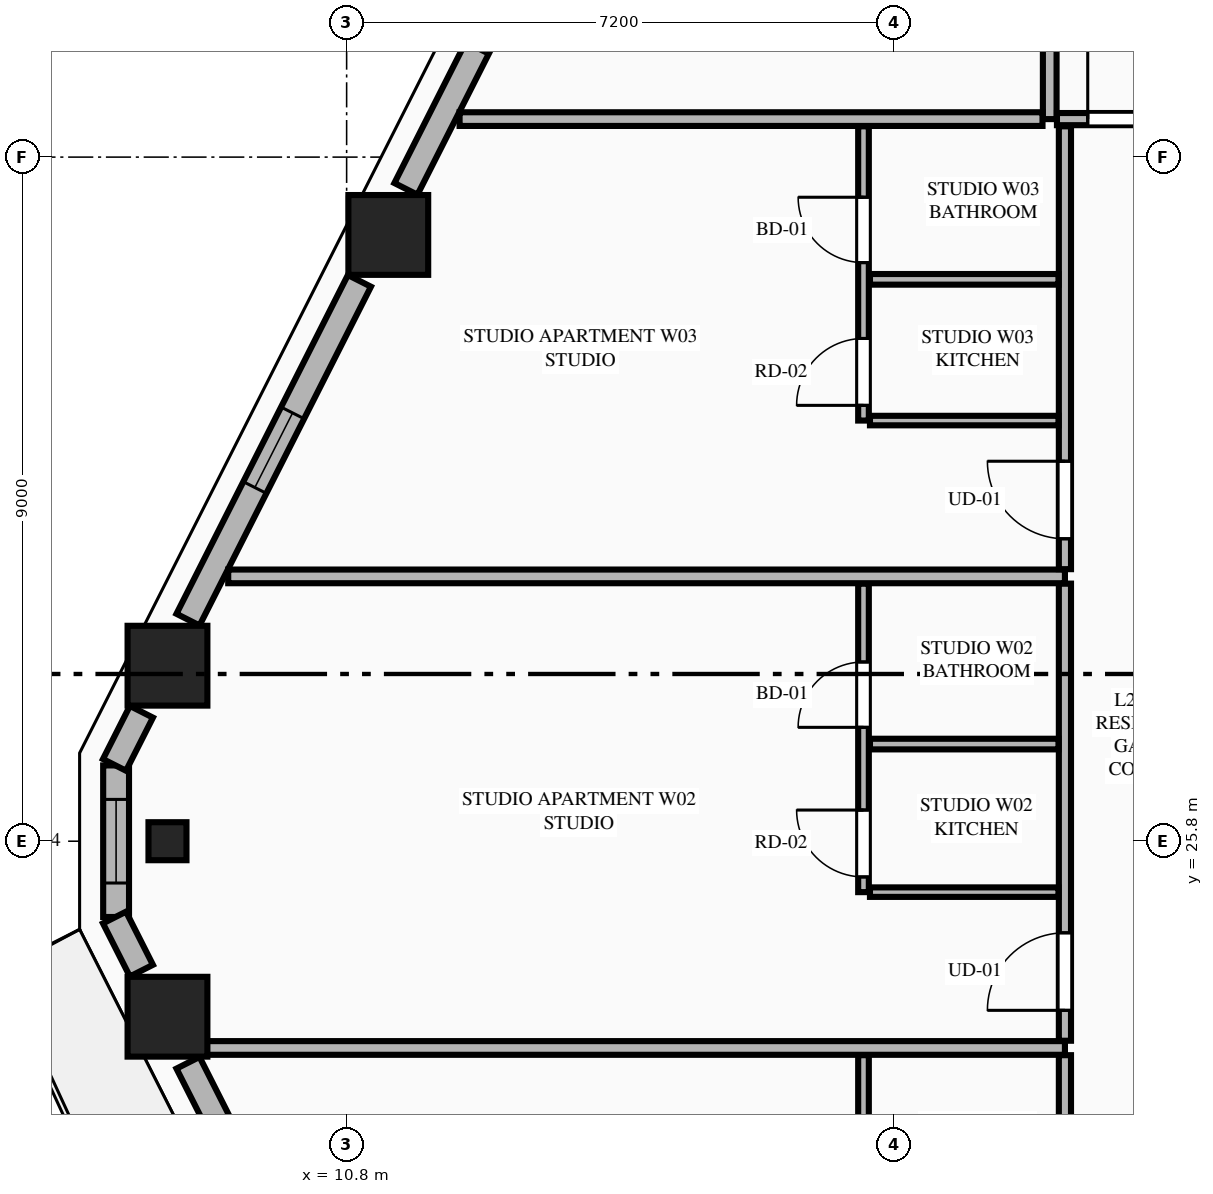
"""IFC4 building model, lengths in metres.
Left out: names, types, materials, properties, quantities, classifications, styles, units other than length and angle.
Written with IfcOpenShell. Run it as: python <this file> out.ifc"""

import sys

from ifc_helpers import new_model, si_unit, direction, frame, frame_2d, origin, origin_2d, place, context, subcontext, project, spatial, rectangle, extrude, element, fill, save


model = new_model("IFC4")
c1 = context("Model", 3, precision=1e-05, world=origin(), true_north=direction((0.0, 1.0)))
c2 = subcontext(c1, "Body", "Model", "MODEL_VIEW")
j1 = project(units=[si_unit("LENGTHUNIT", "METRE"), si_unit("PLANEANGLEUNIT", "RADIAN")], contexts=[c1])
p1 = place(None, origin())
s1 = spatial("IfcSite", under=j1, at=p1, CompositionType="ELEMENT")
p2 = place(p1, origin())
s2 = spatial("IfcBuilding", under=s1, at=p2, CompositionType="ELEMENT")
p3 = place(p2, frame((0.0, 0.0, 112.6)))
s3 = spatial("IfcBuildingStorey", under=s2, at=p3, CompositionType="ELEMENT", Elevation=112.6)
for number, where, z_axis, x_axis in (
    (1, (11.348, 33.776, 0.0), (0.0, 0.0, 1.0), (1.0, 0.0, 0.0)),
    (2, (8.443, 28.109, 0.0), (0.0, 0.0, 1.0), (1.0, 0.0, 0.0)),
    (3, (8.443, 23.491, 0.0), (0.0, 0.0, 1.0), (1.0, 0.0, 0.0)),
):
    element("IfcColumn", number, at=place(p3, frame(where, z_axis=z_axis, x_axis=x_axis)), inside=s3, PredefinedType="COLUMN", context=c2, shape_type="SweptSolid", body=[
        extrude(rectangle(XDim=1.05, YDim=1.05, at=origin_2d()), origin(), (0.0, 0.0, 1.0), 3.55),
    ])
p4 = place(p3, frame((8.443, 25.8, 0.0), z_axis=(0.0, 0.0, 1.0), x_axis=(0.0, -1.0, 0.0)))
e4 = element("IfcColumn", 4, at=p4, inside=s3, PredefinedType="PILASTER", context=c2, shape_type="SweptSolid", body=[
    extrude(rectangle(XDim=0.5, YDim=0.35, at=origin_2d()), origin(), (0.0, 0.0, 1.0), 3.55),
])
p5 = place(p3, frame((7.767, 26.797, 0.0), z_axis=(0.0, 0.0, 1.0), x_axis=(0.0, -1.0, 0.0)))
e5 = element("IfcWall", 5, at=p5, inside=s3, PredefinedType="STANDARD", context=c2, shape_type="SweptSolid", body=[
    extrude(rectangle(XDim=1.994, YDim=0.34, at=frame_2d((0.997, 0.0))), origin(), (0.0, 0.0, 1.0), 3.34),
])
p6 = place(p5, frame((0.447, 0.0, 0.75)))
e6 = element("IfcOpeningElement", 6, at=p6, cuts=e5, PredefinedType="OPENING", context=c2, shape_type="SweptSolid", body=[
    extrude(rectangle(XDim=1.1, YDim=2.0, at=frame_2d((0.55, 1.0))), frame((0.0, 0.18, 0.0), z_axis=(0.0, -1.0, 0.0), x_axis=(1.0, 0.0, 0.0)), (0.0, 0.0, 1.0), 0.36),
])
p7 = place(p3, frame((13.937, 39.039, 0.0), z_axis=(0.0, 0.0, 1.0), x_axis=(-0.451567731634, -0.892236842855, 0.0)))
e7 = element("IfcWall", 7, at=p7, inside=s3, PredefinedType="STANDARD", context=c2, shape_type="SweptSolid", body=[
    extrude(rectangle(XDim=5.219, YDim=0.34, at=frame_2d((2.61, 0.0))), origin(), (0.0, 0.0, 1.0), 2.797),
])
p8 = place(p7, frame((2.06, 0.0, 0.75)))
e8 = element("IfcOpeningElement", 8, at=p8, cuts=e7, PredefinedType="OPENING", context=c2, shape_type="SweptSolid", body=[
    extrude(rectangle(XDim=1.1, YDim=1.897, at=frame_2d((0.55, 0.948))), frame((0.0, 0.18, 0.0), z_axis=(0.0, -1.0, 0.0), x_axis=(1.0, 0.0, 0.0)), (0.0, 0.0, 1.0), 0.36),
])
p9 = place(p3, frame((10.968, 33.172, 0.0), z_axis=(0.0, 0.0, 1.0), x_axis=(-0.451470533039, -0.892286029139, 0.0)))
e9 = element("IfcWall", 9, at=p9, inside=s3, PredefinedType="STANDARD", context=c2, shape_type="SweptSolid", body=[
    extrude(rectangle(XDim=4.995, YDim=0.34, at=frame_2d((2.498, 0.0))), origin(), (0.0, 0.0, 1.0), 2.797),
])
p10 = place(p9, frame((1.947, 0.0, 0.75)))
e10 = element("IfcOpeningElement", 10, at=p10, cuts=e9, PredefinedType="OPENING", context=c2, shape_type="SweptSolid", body=[
    extrude(rectangle(XDim=1.1, YDim=1.897, at=frame_2d((0.55, 0.948))), frame((0.0, 0.18, 0.0), z_axis=(0.0, -1.0, 0.0), x_axis=(1.0, 0.0, 0.0)), (0.0, 0.0, 1.0), 0.36),
])
for number, where, z_axis, x_axis in (
    (11, (8.1, 27.503, 0.0), (0.0, 0.0, 1.0), (-0.452, -0.892, 0.0)),
    (12, (7.746, 24.796, 0.0), (0.0, 0.0, 1.0), (0.452, -0.892, 0.0)),
):
    element("IfcWall", number, at=place(p3, frame(where, z_axis=z_axis, x_axis=x_axis)), inside=s3, PredefinedType="STANDARD", context=c2, shape_type="SweptSolid", body=[
        extrude(rectangle(XDim=0.783, YDim=0.34, at=frame_2d((0.392, 0.0))), origin(), (0.0, 0.0, 1.0), 3.34),
    ])
p11 = place(p3, frame((8.713, 22.885, 0.0), z_axis=(0.0, 0.0, 1.0), x_axis=(0.451470533039, -0.892286029139, 0.0)))
e13 = element("IfcWall", 13, at=p11, inside=s3, PredefinedType="STANDARD", context=c2, shape_type="SweptSolid", body=[
    extrude(rectangle(XDim=4.995, YDim=0.34, at=frame_2d((2.498, 0.0))), origin(), (0.0, 0.0, 1.0), 2.797),
])
p12 = place(p11, frame((1.947, 0.0, 0.75)))
e14 = element("IfcOpeningElement", 14, at=p12, cuts=e13, PredefinedType="OPENING", context=c2, shape_type="SweptSolid", body=[
    extrude(rectangle(XDim=1.1, YDim=1.897, at=frame_2d((0.55, 0.948))), frame((0.0, 0.18, 0.0), z_axis=(0.0, -1.0, 0.0), x_axis=(1.0, 0.0, 0.0)), (0.0, 0.0, 1.0), 0.36),
])
p13 = place(p3, frame((20.05, 35.3, 0.0), z_axis=(0.0, 0.0, 1.0), x_axis=(0.0, 1.0, 0.0)))
e15 = element("IfcWall", 15, at=p13, inside=s3, PredefinedType="PARTITIONING", context=c2, shape_type="SweptSolid", body=[
    extrude(rectangle(XDim=12.195, YDim=0.18, at=frame_2d((6.098, 0.0))), origin(), (0.0, 0.0, 1.0), 3.34),
])
p14 = place(p3, frame((20.145, 35.3, 0.0), z_axis=(0.0, 0.0, 1.0), x_axis=(1.0, 0.0, 0.0)))
e16 = element("IfcWall", 16, at=p14, inside=s3, PredefinedType="PARTITIONING", context=c2, shape_type="SweptSolid", body=[
    extrude(rectangle(XDim=24.51, YDim=0.16, at=frame_2d((12.255, 0.0))), origin(), (0.0, 0.0, 1.0), 3.34),
])
p15 = place(p14, frame((0.405, 0.0, 0.0)))
e17 = element("IfcOpeningElement", 17, at=p15, cuts=e16, PredefinedType="OPENING", context=c2, shape_type="SweptSolid", body=[
    extrude(rectangle(XDim=1.35, YDim=2.35, at=frame_2d((0.675, 1.175))), frame((0.0, 0.09, 0.0), z_axis=(0.0, -1.0, 0.0), x_axis=(1.0, 0.0, 0.0)), (0.0, 0.0, 1.0), 0.18),
])
p16 = place(p3, frame((12.286, 35.3, 0.0), z_axis=(0.0, 0.0, 1.0), x_axis=(1.0, 0.0, 0.0)))
e18 = element("IfcWall", 18, at=p16, inside=s3, PredefinedType="PARTITIONING", context=c2, shape_type="SweptSolid", body=[
    extrude(rectangle(XDim=7.669, YDim=0.18, at=frame_2d((3.834, 0.0))), origin(), (0.0, 0.0, 1.0), 3.34),
])
p17 = place(p3, frame((20.25, 16.595, 0.0), z_axis=(0.0, 0.0, 1.0), x_axis=(0.0, 1.0, 0.0)))
e19 = element("IfcWall", 19, at=p17, inside=s3, PredefinedType="PARTITIONING", context=c2, shape_type="SweptSolid", body=[
    extrude(rectangle(XDim=6.39, YDim=0.16, at=frame_2d((3.195, 0.0))), origin(), (0.0, 0.0, 1.0), 3.34),
])
p18 = place(p17, frame((0.4, 0.0, 0.0)))
e20 = element("IfcOpeningElement", 20, at=p18, cuts=e19, PredefinedType="OPENING", context=c2, shape_type="SweptSolid", body=[
    extrude(rectangle(XDim=1.02, YDim=2.25, at=frame_2d((0.51, 1.125))), frame((0.0, 0.09, 0.0), z_axis=(0.0, -1.0, 0.0), x_axis=(1.0, 0.0, 0.0)), (0.0, 0.0, 1.0), 0.18),
])
p19 = place(p3, frame((17.6, 18.55, 0.0), z_axis=(0.0, 0.0, 1.0), x_axis=(0.0, 1.0, 0.0)))
e21 = element("IfcWall", 21, at=p19, inside=s3, PredefinedType="PLUMBINGWALL", context=c2, shape_type="SweptSolid", body=[
    extrude(rectangle(XDim=4.435, YDim=0.14, at=frame_2d((2.218, 0.0))), origin(), (0.0, 0.0, 1.0), 3.34),
])
p20 = place(p19, frame((2.349, 0.0, 0.0)))
e22 = element("IfcOpeningElement", 22, at=p20, cuts=e21, PredefinedType="OPENING", context=c2, shape_type="SweptSolid", body=[
    extrude(rectangle(XDim=0.86, YDim=2.1, at=frame_2d((0.43, 1.05))), frame((0.0, 0.08, 0.0), z_axis=(0.0, -1.0, 0.0), x_axis=(1.0, 0.0, 0.0)), (0.0, 0.0, 1.0), 0.16),
])
p21 = place(p19, frame((0.2, 0.0, 0.0)))
e23 = element("IfcOpeningElement", 23, at=p21, cuts=e21, PredefinedType="OPENING", context=c2, shape_type="SweptSolid", body=[
    extrude(rectangle(XDim=0.88, YDim=2.15, at=frame_2d((0.44, 1.075))), frame((0.0, 0.08, 0.0), z_axis=(0.0, -1.0, 0.0), x_axis=(1.0, 0.0, 0.0)), (0.0, 0.0, 1.0), 0.16),
])
p22 = place(p3, frame((8.856, 23.08, 0.0), z_axis=(0.0, 0.0, 1.0), x_axis=(1.0, 0.0, 0.0)))
e24 = element("IfcWall", 24, at=p22, inside=s3, PredefinedType="PARTITIONING", context=c2, shape_type="SweptSolid", body=[
    extrude(rectangle(XDim=11.394, YDim=0.18, at=frame_2d((5.697, 0.0))), origin(), (0.0, 0.0, 1.0), 3.34),
])
p23 = place(p3, frame((20.25, 23.175, 0.0), z_axis=(0.0, 0.0, 1.0), x_axis=(0.0, 1.0, 0.0)))
e25 = element("IfcWall", 25, at=p23, inside=s3, PredefinedType="PARTITIONING", context=c2, shape_type="SweptSolid", body=[
    extrude(rectangle(XDim=6.014, YDim=0.16, at=frame_2d((3.007, 0.0))), origin(), (0.0, 0.0, 1.0), 3.34),
])
p24 = place(p23, frame((0.4, 0.0, 0.0)))
e26 = element("IfcOpeningElement", 26, at=p24, cuts=e25, PredefinedType="OPENING", context=c2, shape_type="SweptSolid", body=[
    extrude(rectangle(XDim=1.02, YDim=2.25, at=frame_2d((0.51, 1.125))), frame((0.0, 0.09, 0.0), z_axis=(0.0, -1.0, 0.0), x_axis=(1.0, 0.0, 0.0)), (0.0, 0.0, 1.0), 0.18),
])
p25 = place(p3, frame((17.685, 25.13, 0.0), z_axis=(0.0, 0.0, 1.0), x_axis=(1.0, 0.0, 0.0)))
e27 = element("IfcWall", 27, at=p25, inside=s3, PredefinedType="PARTITIONING", context=c2, shape_type="SweptSolid", body=[
    extrude(rectangle(XDim=2.48, YDim=0.125, at=frame_2d((1.24, 0.0))), origin(), (0.0, 0.0, 1.0), 3.34),
])
p26 = place(p3, frame((17.6, 25.13, 0.0), z_axis=(0.0, 0.0, 1.0), x_axis=(0.0, 1.0, 0.0)))
e28 = element("IfcWall", 28, at=p26, inside=s3, PredefinedType="PLUMBINGWALL", context=c2, shape_type="SweptSolid", body=[
    extrude(rectangle(XDim=4.059, YDim=0.14, at=frame_2d((2.03, 0.0))), origin(), (0.0, 0.0, 1.0), 3.34),
])
p27 = place(p26, frame((2.168, 0.0, 0.0)))
e29 = element("IfcOpeningElement", 29, at=p27, cuts=e28, PredefinedType="OPENING", context=c2, shape_type="SweptSolid", body=[
    extrude(rectangle(XDim=0.86, YDim=2.1, at=frame_2d((0.43, 1.05))), frame((0.0, 0.08, 0.0), z_axis=(0.0, -1.0, 0.0), x_axis=(1.0, 0.0, 0.0)), (0.0, 0.0, 1.0), 0.16),
])
p28 = place(p26, frame((0.2, 0.0, 0.0)))
e30 = element("IfcOpeningElement", 30, at=p28, cuts=e28, PredefinedType="OPENING", context=c2, shape_type="SweptSolid", body=[
    extrude(rectangle(XDim=0.88, YDim=2.15, at=frame_2d((0.44, 1.075))), frame((0.0, 0.08, 0.0), z_axis=(0.0, -1.0, 0.0), x_axis=(1.0, 0.0, 0.0)), (0.0, 0.0, 1.0), 0.16),
])
p29 = place(p3, frame((17.685, 27.078, 0.0), z_axis=(0.0, 0.0, 1.0), x_axis=(1.0, 0.0, 0.0)))
e31 = element("IfcWall", 31, at=p29, inside=s3, PredefinedType="PLUMBINGWALL", context=c2, shape_type="SweptSolid", body=[
    extrude(rectangle(XDim=2.48, YDim=0.14, at=frame_2d((1.24, 0.0))), origin(), (0.0, 0.0, 1.0), 3.34),
])
p30 = place(p3, frame((9.242, 29.284, 0.0), z_axis=(0.0, 0.0, 1.0), x_axis=(1.0, 0.0, 0.0)))
e32 = element("IfcWall", 32, at=p30, inside=s3, PredefinedType="PARTITIONING", context=c2, shape_type="SweptSolid", body=[
    extrude(rectangle(XDim=11.008, YDim=0.18, at=frame_2d((5.504, 0.0))), origin(), (0.0, 0.0, 1.0), 3.34),
])
p31 = place(p3, frame((20.25, 29.379, 0.0), z_axis=(0.0, 0.0, 1.0), x_axis=(0.0, 1.0, 0.0)))
e33 = element("IfcWall", 33, at=p31, inside=s3, PredefinedType="PARTITIONING", context=c2, shape_type="SweptSolid", body=[
    extrude(rectangle(XDim=5.826, YDim=0.16, at=frame_2d((2.913, 0.0))), origin(), (0.0, 0.0, 1.0), 3.34),
])
p32 = place(p31, frame((0.4, 0.0, 0.0)))
e34 = element("IfcOpeningElement", 34, at=p32, cuts=e33, PredefinedType="OPENING", context=c2, shape_type="SweptSolid", body=[
    extrude(rectangle(XDim=1.02, YDim=2.25, at=frame_2d((0.51, 1.125))), frame((0.0, 0.09, 0.0), z_axis=(0.0, -1.0, 0.0), x_axis=(1.0, 0.0, 0.0)), (0.0, 0.0, 1.0), 0.18),
])
p33 = place(p3, frame((17.685, 31.334, 0.0), z_axis=(0.0, 0.0, 1.0), x_axis=(1.0, 0.0, 0.0)))
e35 = element("IfcWall", 35, at=p33, inside=s3, PredefinedType="PARTITIONING", context=c2, shape_type="SweptSolid", body=[
    extrude(rectangle(XDim=2.48, YDim=0.125, at=frame_2d((1.24, 0.0))), origin(), (0.0, 0.0, 1.0), 3.34),
])
p34 = place(p3, frame((17.6, 31.334, 0.0), z_axis=(0.0, 0.0, 1.0), x_axis=(0.0, 1.0, 0.0)))
e36 = element("IfcWall", 36, at=p34, inside=s3, PredefinedType="PLUMBINGWALL", context=c2, shape_type="SweptSolid", body=[
    extrude(rectangle(XDim=3.871, YDim=0.14, at=frame_2d((1.936, 0.0))), origin(), (0.0, 0.0, 1.0), 3.34),
])
p35 = place(p34, frame((2.078, 0.0, 0.0)))
e37 = element("IfcOpeningElement", 37, at=p35, cuts=e36, PredefinedType="OPENING", context=c2, shape_type="SweptSolid", body=[
    extrude(rectangle(XDim=0.86, YDim=2.1, at=frame_2d((0.43, 1.05))), frame((0.0, 0.08, 0.0), z_axis=(0.0, -1.0, 0.0), x_axis=(1.0, 0.0, 0.0)), (0.0, 0.0, 1.0), 0.16),
])
p36 = place(p34, frame((0.2, 0.0, 0.0)))
e38 = element("IfcOpeningElement", 38, at=p36, cuts=e36, PredefinedType="OPENING", context=c2, shape_type="SweptSolid", body=[
    extrude(rectangle(XDim=0.88, YDim=2.15, at=frame_2d((0.44, 1.075))), frame((0.0, 0.08, 0.0), z_axis=(0.0, -1.0, 0.0), x_axis=(1.0, 0.0, 0.0)), (0.0, 0.0, 1.0), 0.16),
])
p37 = place(p3, frame((17.685, 33.192, 0.0), z_axis=(0.0, 0.0, 1.0), x_axis=(1.0, 0.0, 0.0)))
e39 = element("IfcWall", 39, at=p37, inside=s3, PredefinedType="PLUMBINGWALL", context=c2, shape_type="SweptSolid", body=[
    extrude(rectangle(XDim=2.48, YDim=0.14, at=frame_2d((1.24, 0.0))), origin(), (0.0, 0.0, 1.0), 2.722),
])
p38 = place(p10, origin())
e40 = element("IfcWindow", 40, at=p38, inside=s3, PartitioningType="SINGLE_PANEL", PredefinedType="WINDOW", context=c2, shape_type="SweptSolid", body=[
    extrude(rectangle(XDim=1.1, YDim=1.897, at=frame_2d((0.55, 0.948))), frame((0.0, 0.03, 0.0), z_axis=(0.0, -1.0, 0.0), x_axis=(1.0, 0.0, 0.0)), (0.0, 0.0, 1.0), 0.06),
])
fill(e10, e40)
p39 = place(p15, origin())
e41 = element("IfcDoor", 41, at=p39, inside=s3, OperationType="SINGLE_SWING_LEFT", PredefinedType="DOOR", context=c2, shape_type="SweptSolid", body=[
    extrude(rectangle(XDim=1.35, YDim=2.35, at=frame_2d((0.675, 1.175))), frame((0.0, 0.025, 0.0), z_axis=(0.0, -1.0, 0.0), x_axis=(1.0, 0.0, 0.0)), (0.0, 0.0, 1.0), 0.05),
])
fill(e17, e41)
p40 = place(p27, origin())
e42 = element("IfcDoor", 42, at=p40, inside=s3, OperationType="SINGLE_SWING_LEFT", PredefinedType="DOOR", context=c2, shape_type="SweptSolid", body=[
    extrude(rectangle(XDim=0.86, YDim=2.1, at=frame_2d((0.43, 1.05))), frame((0.0, 0.025, 0.0), z_axis=(0.0, -1.0, 0.0), x_axis=(1.0, 0.0, 0.0)), (0.0, 0.0, 1.0), 0.05),
])
fill(e29, e42)
p41 = place(p24, origin())
e43 = element("IfcDoor", 43, at=p41, inside=s3, OperationType="SINGLE_SWING_LEFT", PredefinedType="DOOR", context=c2, shape_type="SweptSolid", body=[
    extrude(rectangle(XDim=1.02, YDim=2.25, at=frame_2d((0.51, 1.125))), frame((0.0, 0.025, 0.0), z_axis=(0.0, -1.0, 0.0), x_axis=(1.0, 0.0, 0.0)), (0.0, 0.0, 1.0), 0.05),
])
fill(e26, e43)
p42 = place(p28, origin())
e44 = element("IfcDoor", 44, at=p42, inside=s3, OperationType="SINGLE_SWING_RIGHT", PredefinedType="DOOR", context=c2, shape_type="SweptSolid", body=[
    extrude(rectangle(XDim=0.88, YDim=2.15, at=frame_2d((0.44, 1.075))), frame((0.0, 0.025, 0.0), z_axis=(0.0, -1.0, 0.0), x_axis=(1.0, 0.0, 0.0)), (0.0, 0.0, 1.0), 0.05),
])
fill(e30, e44)
p43 = place(p35, origin())
e45 = element("IfcDoor", 45, at=p43, inside=s3, OperationType="SINGLE_SWING_RIGHT", PredefinedType="DOOR", context=c2, shape_type="SweptSolid", body=[
    extrude(rectangle(XDim=0.86, YDim=2.1, at=frame_2d((0.43, 1.05))), frame((0.0, 0.025, 0.0), z_axis=(0.0, -1.0, 0.0), x_axis=(1.0, 0.0, 0.0)), (0.0, 0.0, 1.0), 0.05),
])
fill(e37, e45)
p44 = place(p32, origin())
e46 = element("IfcDoor", 46, at=p44, inside=s3, OperationType="SINGLE_SWING_RIGHT", PredefinedType="DOOR", context=c2, shape_type="SweptSolid", body=[
    extrude(rectangle(XDim=1.02, YDim=2.25, at=frame_2d((0.51, 1.125))), frame((0.0, 0.025, 0.0), z_axis=(0.0, -1.0, 0.0), x_axis=(1.0, 0.0, 0.0)), (0.0, 0.0, 1.0), 0.05),
])
fill(e34, e46)
p45 = place(p36, origin())
e47 = element("IfcDoor", 47, at=p45, inside=s3, OperationType="SINGLE_SWING_LEFT", PredefinedType="DOOR", context=c2, shape_type="SweptSolid", body=[
    extrude(rectangle(XDim=0.88, YDim=2.15, at=frame_2d((0.44, 1.075))), frame((0.0, 0.025, 0.0), z_axis=(0.0, -1.0, 0.0), x_axis=(1.0, 0.0, 0.0)), (0.0, 0.0, 1.0), 0.05),
])
fill(e38, e47)
p46 = place(p6, origin())
e48 = element("IfcWindow", 48, at=p46, inside=s3, PartitioningType="SINGLE_PANEL", PredefinedType="WINDOW", context=c2, shape_type="SweptSolid", body=[
    extrude(rectangle(XDim=1.1, YDim=2.0, at=frame_2d((0.55, 1.0))), frame((0.0, 0.03, 0.0), z_axis=(0.0, -1.0, 0.0), x_axis=(1.0, 0.0, 0.0)), (0.0, 0.0, 1.0), 0.06),
])
fill(e6, e48)
save(model, sys.argv[1])
